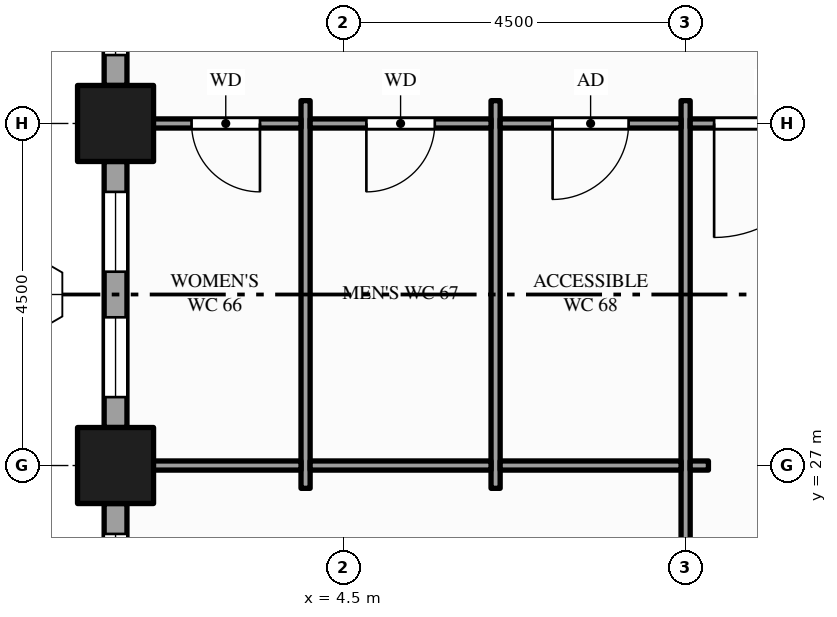
"""IFC4 building model, lengths in metres.
Left out: names, types, materials, properties, quantities, classifications, styles, units other than length and angle.
Written with IfcOpenShell. Run it as: python <this file> out.ifc"""

import sys

from ifc_helpers import new_model, si_unit, direction, frame, frame_2d, origin, origin_2d, place, context, subcontext, project, spatial, rectangle, hollow_rectangle, extrude, element, fill, save


model = new_model("IFC4")
c1 = context("Model", 3, precision=1e-05, world=origin(), true_north=direction((0.0, 1.0)))
c2 = subcontext(c1, "Body", "Model", "MODEL_VIEW")
j1 = project(units=[si_unit("LENGTHUNIT", "METRE"), si_unit("PLANEANGLEUNIT", "RADIAN")], contexts=[c1])
p1 = place(None, origin())
s1 = spatial("IfcSite", under=j1, at=p1, CompositionType="ELEMENT")
p2 = place(p1, origin())
s2 = spatial("IfcBuilding", under=s1, at=p2, CompositionType="ELEMENT")
p3 = place(p2, frame((0.0, 0.0, 123.0)))
s3 = spatial("IfcBuildingStorey", under=s2, at=p3, CompositionType="ELEMENT", Elevation=123.0)
for number, where, z_axis, x_axis in (
    (1, (1.5, 27.0, -0.15), (0.0, 0.0, 1.0), (1.0, 0.0, 0.0)),
    (2, (1.5, 31.5, -0.15), (0.0, 0.0, 1.0), (1.0, 0.0, 0.0)),
):
    element("IfcColumn", number, at=place(p3, frame(where, z_axis=z_axis, x_axis=x_axis)), inside=s3, PredefinedType="COLUMN", context=c2, shape_type="SweptSolid", body=[
        extrude(hollow_rectangle(XDim=1.0, YDim=1.0, WallThickness=0.05, at=origin_2d()), origin(), (0.0, 0.0, 1.0), 4.0),
    ])
p4 = place(p3, frame((1.5, 36.0, 0.0), z_axis=(0.0, 0.0, 1.0), x_axis=(0.0, -1.0, 0.0)))
e3 = element("IfcWall", 3, at=p4, inside=s3, PredefinedType="STANDARD", context=c2, shape_type="SweptSolid", body=[
    extrude(rectangle(XDim=4.0, YDim=0.3, at=frame_2d((2.0, 0.0))), origin(), (0.0, 0.0, 1.0), 3.154),
])
p5 = place(p4, frame((0.4, 0.0, 0.9)))
e4 = element("IfcOpeningElement", 4, at=p5, cuts=e3, PredefinedType="OPENING", context=c2, shape_type="SweptSolid", body=[
    extrude(rectangle(XDim=1.55, YDim=2.0, at=frame_2d((0.775, 1.0))), frame((0.0, 0.16, 0.0), z_axis=(0.0, -1.0, 0.0), x_axis=(1.0, 0.0, 0.0)), (0.0, 0.0, 1.0), 0.32),
])
p6 = place(p4, frame((2.55, 0.0, 0.9)))
e5 = element("IfcOpeningElement", 5, at=p6, cuts=e3, PredefinedType="OPENING", context=c2, shape_type="SweptSolid", body=[
    extrude(rectangle(XDim=1.05, YDim=2.0, at=frame_2d((0.525, 1.0))), frame((0.0, 0.16, 0.0), z_axis=(0.0, -1.0, 0.0), x_axis=(1.0, 0.0, 0.0)), (0.0, 0.0, 1.0), 0.32),
])
p7 = place(p3, frame((1.5, 31.0, 0.0), z_axis=(0.0, 0.0, 1.0), x_axis=(0.0, -1.0, 0.0)))
e6 = element("IfcWall", 6, at=p7, inside=s3, PredefinedType="STANDARD", context=c2, shape_type="SweptSolid", body=[
    extrude(rectangle(XDim=3.5, YDim=0.3, at=frame_2d((1.75, 0.0))), origin(), (0.0, 0.0, 1.0), 3.154),
])
p8 = place(p7, frame((0.4, 0.0, 0.9)))
e7 = element("IfcOpeningElement", 7, at=p8, cuts=e6, PredefinedType="OPENING", context=c2, shape_type="SweptSolid", body=[
    extrude(rectangle(XDim=1.05, YDim=2.0, at=frame_2d((0.525, 1.0))), frame((0.0, 0.16, 0.0), z_axis=(0.0, -1.0, 0.0), x_axis=(1.0, 0.0, 0.0)), (0.0, 0.0, 1.0), 0.32),
])
p9 = place(p7, frame((2.05, 0.0, 0.9)))
e8 = element("IfcOpeningElement", 8, at=p9, cuts=e6, PredefinedType="OPENING", context=c2, shape_type="SweptSolid", body=[
    extrude(rectangle(XDim=1.05, YDim=2.0, at=frame_2d((0.525, 1.0))), frame((0.0, 0.16, 0.0), z_axis=(0.0, -1.0, 0.0), x_axis=(1.0, 0.0, 0.0)), (0.0, 0.0, 1.0), 0.32),
])
p10 = place(p3, frame((1.5, 26.5, 0.0), z_axis=(0.0, 0.0, 1.0), x_axis=(0.0, -1.0, 0.0)))
e9 = element("IfcWall", 9, at=p10, inside=s3, PredefinedType="STANDARD", context=c2, shape_type="SweptSolid", body=[
    extrude(rectangle(XDim=3.5, YDim=0.3, at=frame_2d((1.75, 0.0))), origin(), (0.0, 0.0, 1.0), 3.154),
])
p11 = place(p10, frame((0.4, 0.0, 0.9)))
e10 = element("IfcOpeningElement", 10, at=p11, cuts=e9, PredefinedType="OPENING", context=c2, shape_type="SweptSolid", body=[
    extrude(rectangle(XDim=1.05, YDim=2.0, at=frame_2d((0.525, 1.0))), frame((0.0, 0.16, 0.0), z_axis=(0.0, -1.0, 0.0), x_axis=(1.0, 0.0, 0.0)), (0.0, 0.0, 1.0), 0.32),
])
p12 = place(p10, frame((2.05, 0.0, 0.9)))
e11 = element("IfcOpeningElement", 11, at=p12, cuts=e9, PredefinedType="OPENING", context=c2, shape_type="SweptSolid", body=[
    extrude(rectangle(XDim=1.05, YDim=2.0, at=frame_2d((0.525, 1.0))), frame((0.0, 0.16, 0.0), z_axis=(0.0, -1.0, 0.0), x_axis=(1.0, 0.0, 0.0)), (0.0, 0.0, 1.0), 0.32),
])
for number, where, z_axis, x_axis in (
    (12, (4.0, 26.7, 0.0), (0.0, 0.0, 1.0), (0.0, 1.0, 0.0)),
    (13, (6.5, 26.7, 0.0), (0.0, 0.0, 1.0), (0.0, 1.0, 0.0)),
):
    element("IfcWall", number, at=place(p3, frame(where, z_axis=z_axis, x_axis=x_axis)), inside=s3, PredefinedType="PARTITIONING", context=c2, shape_type="SweptSolid", body=[
        extrude(rectangle(XDim=5.1, YDim=0.12, at=frame_2d((2.55, 0.0))), origin(), (0.0, 0.0, 1.0), 3.85),
    ])
p13 = place(p3, frame((9.0, 13.2, 0.0), z_axis=(0.0, 0.0, 1.0), x_axis=(0.0, 1.0, 0.0)))
e14 = element("IfcWall", 14, at=p13, inside=s3, PredefinedType="PARTITIONING", context=c2, shape_type="SweptSolid", body=[
    extrude(rectangle(XDim=18.6, YDim=0.12, at=frame_2d((9.3, 0.0))), origin(), (0.0, 0.0, 1.0), 2.6),
])
p14 = place(p13, frame((3.175, 0.0, 0.0)))
e15 = element("IfcOpeningElement", 15, at=p14, cuts=e14, PredefinedType="OPENING", context=c2, shape_type="SweptSolid", body=[
    extrude(rectangle(XDim=1.0, YDim=2.1, at=frame_2d((0.5, 1.05))), frame((0.0, 0.07, 0.0), z_axis=(0.0, -1.0, 0.0), x_axis=(1.0, 0.0, 0.0)), (0.0, 0.0, 1.0), 0.14),
])
p15 = place(p13, frame((9.955, 0.0, 0.0)))
e16 = element("IfcOpeningElement", 16, at=p15, cuts=e14, PredefinedType="OPENING", context=c2, shape_type="SweptSolid", body=[
    extrude(rectangle(XDim=1.0, YDim=2.1, at=frame_2d((0.5, 1.05))), frame((0.0, 0.07, 0.0), z_axis=(0.0, -1.0, 0.0), x_axis=(1.0, 0.0, 0.0)), (0.0, 0.0, 1.0), 0.14),
])
p16 = place(p3, frame((1.65, 27.0, 0.0), z_axis=(0.0, 0.0, 1.0), x_axis=(1.0, 0.0, 0.0)))
e17 = element("IfcWall", 17, at=p16, inside=s3, PredefinedType="PARTITIONING", context=c2, shape_type="SweptSolid", body=[
    extrude(rectangle(XDim=2.29, YDim=0.12, at=frame_2d((1.145, 0.0))), origin(), (0.0, 0.0, 1.0), 2.938),
])
for number, where, z_axis, x_axis in (
    (18, (4.06, 27.0, 0.0), (0.0, 0.0, 1.0), (1.0, 0.0, 0.0)),
    (19, (6.56, 27.0, 0.0), (0.0, 0.0, 1.0), (1.0, 0.0, 0.0)),
):
    element("IfcWall", number, at=place(p3, frame(where, z_axis=z_axis, x_axis=x_axis)), inside=s3, PredefinedType="PARTITIONING", context=c2, shape_type="SweptSolid", body=[
        extrude(rectangle(XDim=2.38, YDim=0.12, at=frame_2d((1.19, 0.0))), origin(), (0.0, 0.0, 1.0), 2.938),
    ])
p17 = place(p3, frame((9.06, 27.0, 0.0), z_axis=(0.0, 0.0, 1.0), x_axis=(1.0, 0.0, 0.0)))
e20 = element("IfcWall", 20, at=p17, inside=s3, PredefinedType="PARTITIONING", context=c2, shape_type="SweptSolid", body=[
    extrude(rectangle(XDim=0.24, YDim=0.12, at=frame_2d((0.12, 0.0))), origin(), (0.0, 0.0, 1.0), 2.938),
])
p18 = place(p3, frame((1.65, 31.5, 0.0), z_axis=(0.0, 0.0, 1.0), x_axis=(1.0, 0.0, 0.0)))
e21 = element("IfcWall", 21, at=p18, inside=s3, PredefinedType="PARTITIONING", context=c2, shape_type="SweptSolid", body=[
    extrude(rectangle(XDim=2.29, YDim=0.12, at=frame_2d((1.145, 0.0))), origin(), (0.0, 0.0, 1.0), 2.938),
])
p19 = place(p18, frame((0.85, 0.0, 0.0)))
e22 = element("IfcOpeningElement", 22, at=p19, cuts=e21, PredefinedType="OPENING", context=c2, shape_type="SweptSolid", body=[
    extrude(rectangle(XDim=0.9, YDim=2.1, at=frame_2d((0.45, 1.05))), frame((0.0, 0.07, 0.0), z_axis=(0.0, -1.0, 0.0), x_axis=(1.0, 0.0, 0.0)), (0.0, 0.0, 1.0), 0.14),
])
p20 = place(p3, frame((4.06, 31.5, 0.0), z_axis=(0.0, 0.0, 1.0), x_axis=(1.0, 0.0, 0.0)))
e23 = element("IfcWall", 23, at=p20, inside=s3, PredefinedType="PARTITIONING", context=c2, shape_type="SweptSolid", body=[
    extrude(rectangle(XDim=2.38, YDim=0.12, at=frame_2d((1.19, 0.0))), origin(), (0.0, 0.0, 1.0), 2.938),
])
p21 = place(p20, frame((0.74, 0.0, 0.0)))
e24 = element("IfcOpeningElement", 24, at=p21, cuts=e23, PredefinedType="OPENING", context=c2, shape_type="SweptSolid", body=[
    extrude(rectangle(XDim=0.9, YDim=2.1, at=frame_2d((0.45, 1.05))), frame((0.0, 0.07, 0.0), z_axis=(0.0, -1.0, 0.0), x_axis=(1.0, 0.0, 0.0)), (0.0, 0.0, 1.0), 0.14),
])
p22 = place(p3, frame((6.56, 31.5, 0.0), z_axis=(0.0, 0.0, 1.0), x_axis=(1.0, 0.0, 0.0)))
e25 = element("IfcWall", 25, at=p22, inside=s3, PredefinedType="PARTITIONING", context=c2, shape_type="SweptSolid", body=[
    extrude(rectangle(XDim=2.38, YDim=0.12, at=frame_2d((1.19, 0.0))), origin(), (0.0, 0.0, 1.0), 2.938),
])
p23 = place(p22, frame((0.69, 0.0, 0.0)))
e26 = element("IfcOpeningElement", 26, at=p23, cuts=e25, PredefinedType="OPENING", context=c2, shape_type="SweptSolid", body=[
    extrude(rectangle(XDim=1.0, YDim=2.1, at=frame_2d((0.5, 1.05))), frame((0.0, 0.07, 0.0), z_axis=(0.0, -1.0, 0.0), x_axis=(1.0, 0.0, 0.0)), (0.0, 0.0, 1.0), 0.14),
])
p24 = place(p3, frame((9.06, 31.5, 0.0), z_axis=(0.0, 0.0, 1.0), x_axis=(1.0, 0.0, 0.0)))
e27 = element("IfcWall", 27, at=p24, inside=s3, PredefinedType="PARTITIONING", context=c2, shape_type="SweptSolid", body=[
    extrude(rectangle(XDim=2.13, YDim=0.12, at=frame_2d((1.065, 0.0))), origin(), (0.0, 0.0, 1.0), 2.938),
])
p25 = place(p24, frame((0.315, 0.0, 0.0)))
e28 = element("IfcOpeningElement", 28, at=p25, cuts=e27, PredefinedType="OPENING", context=c2, shape_type="SweptSolid", body=[
    extrude(rectangle(XDim=1.5, YDim=2.1, at=frame_2d((0.75, 1.05))), frame((0.0, 0.07, 0.0), z_axis=(0.0, -1.0, 0.0), x_axis=(1.0, 0.0, 0.0)), (0.0, 0.0, 1.0), 0.14),
])
p26 = place(p6, origin())
e29 = element("IfcWindow", 29, at=p26, inside=s3, PartitioningType="SINGLE_PANEL", PredefinedType="WINDOW", context=c2, shape_type="SweptSolid", body=[
    extrude(rectangle(XDim=1.05, YDim=2.0, at=frame_2d((0.525, 1.0))), frame((0.0, 0.03, 0.0), z_axis=(0.0, -1.0, 0.0), x_axis=(1.0, 0.0, 0.0)), (0.0, 0.0, 1.0), 0.06),
])
fill(e5, e29)
p27 = place(p8, origin())
e30 = element("IfcWindow", 30, at=p27, inside=s3, PartitioningType="SINGLE_PANEL", PredefinedType="WINDOW", context=c2, shape_type="SweptSolid", body=[
    extrude(rectangle(XDim=1.05, YDim=2.0, at=frame_2d((0.525, 1.0))), frame((0.0, 0.03, 0.0), z_axis=(0.0, -1.0, 0.0), x_axis=(1.0, 0.0, 0.0)), (0.0, 0.0, 1.0), 0.06),
])
fill(e7, e30)
p28 = place(p9, origin())
e31 = element("IfcWindow", 31, at=p28, inside=s3, PartitioningType="SINGLE_PANEL", PredefinedType="WINDOW", context=c2, shape_type="SweptSolid", body=[
    extrude(rectangle(XDim=1.05, YDim=2.0, at=frame_2d((0.525, 1.0))), frame((0.0, 0.03, 0.0), z_axis=(0.0, -1.0, 0.0), x_axis=(1.0, 0.0, 0.0)), (0.0, 0.0, 1.0), 0.06),
])
fill(e8, e31)
p29 = place(p11, origin())
e32 = element("IfcWindow", 32, at=p29, inside=s3, PartitioningType="SINGLE_PANEL", PredefinedType="WINDOW", context=c2, shape_type="SweptSolid", body=[
    extrude(rectangle(XDim=1.05, YDim=2.0, at=frame_2d((0.525, 1.0))), frame((0.0, 0.03, 0.0), z_axis=(0.0, -1.0, 0.0), x_axis=(1.0, 0.0, 0.0)), (0.0, 0.0, 1.0), 0.06),
])
fill(e10, e32)
p30 = place(p25, origin())
e33 = element("IfcDoor", 33, at=p30, inside=s3, OperationType="SINGLE_SWING_LEFT", PredefinedType="DOOR", context=c2, shape_type="SweptSolid", body=[
    extrude(rectangle(XDim=1.5, YDim=2.1, at=frame_2d((0.75, 1.05))), frame((0.0, 0.025, 0.0), z_axis=(0.0, -1.0, 0.0), x_axis=(1.0, 0.0, 0.0)), (0.0, 0.0, 1.0), 0.05),
])
fill(e28, e33)
p31 = place(p19, origin())
e34 = element("IfcDoor", 34, at=p31, inside=s3, OperationType="SINGLE_SWING_RIGHT", PredefinedType="DOOR", context=c2, shape_type="SweptSolid", body=[
    extrude(rectangle(XDim=0.9, YDim=2.1, at=frame_2d((0.45, 1.05))), frame((0.0, 0.025, 0.0), z_axis=(0.0, -1.0, 0.0), x_axis=(1.0, 0.0, 0.0)), (0.0, 0.0, 1.0), 0.05),
])
fill(e22, e34)
p32 = place(p21, origin())
e35 = element("IfcDoor", 35, at=p32, inside=s3, OperationType="SINGLE_SWING_LEFT", PredefinedType="DOOR", context=c2, shape_type="SweptSolid", body=[
    extrude(rectangle(XDim=0.9, YDim=2.1, at=frame_2d((0.45, 1.05))), frame((0.0, 0.025, 0.0), z_axis=(0.0, -1.0, 0.0), x_axis=(1.0, 0.0, 0.0)), (0.0, 0.0, 1.0), 0.05),
])
fill(e24, e35)
p33 = place(p23, origin())
e36 = element("IfcDoor", 36, at=p33, inside=s3, OperationType="SINGLE_SWING_LEFT", PredefinedType="DOOR", context=c2, shape_type="SweptSolid", body=[
    extrude(rectangle(XDim=1.0, YDim=2.1, at=frame_2d((0.5, 1.05))), frame((0.0, 0.025, 0.0), z_axis=(0.0, -1.0, 0.0), x_axis=(1.0, 0.0, 0.0)), (0.0, 0.0, 1.0), 0.05),
])
fill(e26, e36)
save(model, sys.argv[1])
